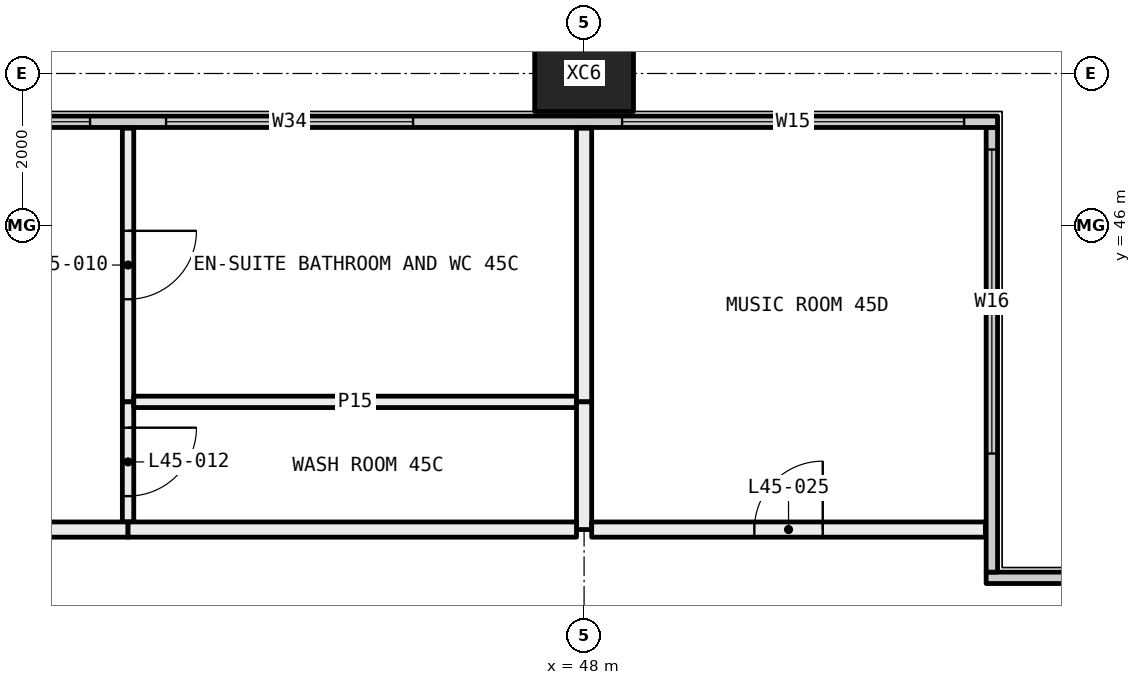
"""IFC4 building model, lengths in metres.
Left out: names, types, materials, properties, quantities, classifications, styles, units other than length and angle.
Written with IfcOpenShell. Run it as: python <this file> out.ifc"""

import sys

from ifc_helpers import new_model, si_unit, direction, frame, frame_2d, origin, origin_2d, place, context, subcontext, project, spatial, rectangle, hollow_rectangle, extrude, element, fill, save


model = new_model("IFC4")
c1 = context("Model", 3, precision=1e-05, world=origin(), true_north=direction((0.0, 1.0)))
c2 = subcontext(c1, "Body", "Model", "MODEL_VIEW")
j1 = project(units=[si_unit("LENGTHUNIT", "METRE"), si_unit("PLANEANGLEUNIT", "RADIAN")], contexts=[c1])
p1 = place(None, origin())
s1 = spatial("IfcSite", under=j1, at=p1, CompositionType="ELEMENT")
p2 = place(p1, origin())
s2 = spatial("IfcBuilding", under=s1, at=p2, CompositionType="ELEMENT")
p3 = place(p2, frame((0.0, 0.0, 172.05)))
s3 = spatial("IfcBuildingStorey", under=s2, at=p3, CompositionType="ELEMENT", Elevation=172.05)
p4 = place(p3, frame((48.0, 48.0, -0.4), z_axis=(0.0, 0.0, 1.0), x_axis=(1.0, 0.0, 0.0)))
e1 = element("IfcColumn", 1, at=p4, inside=s3, PredefinedType="COLUMN", context=c2, shape_type="SweptSolid", body=[
    extrude(hollow_rectangle(XDim=1.3, YDim=1.0, WallThickness=0.05, at=origin_2d()), origin(), (0.0, 0.0, 1.0), 3.45),
])
p5 = place(p3, frame((53.29, 41.365, 0.0), z_axis=(0.0, 0.0, 1.0), x_axis=(1.0, 0.0, 0.0)))
e2 = element("IfcWall", 2, at=p5, inside=s3, PredefinedType="ELEMENTEDWALL", context=c2, shape_type="SweptSolid", body=[
    extrude(rectangle(XDim=6.15, YDim=0.15, at=frame_2d((3.075, 0.0))), origin(), (0.0, 0.0, 1.0), 3.05),
])
p6 = place(p5, frame((1.71, 0.0, 0.45)))
e3 = element("IfcOpeningElement", 3, at=p6, cuts=e2, PredefinedType="OPENING", context=c2, shape_type="SweptSolid", body=[
    extrude(rectangle(XDim=4.0, YDim=2.55, at=frame_2d((2.0, 1.275))), frame((0.0, 0.085, 0.0), z_axis=(0.0, -1.0, 0.0), x_axis=(1.0, 0.0, 0.0)), (0.0, 0.0, 1.0), 0.17),
])
p7 = place(p3, frame((53.365, 41.44, 0.0), z_axis=(0.0, 0.0, 1.0), x_axis=(0.0, 1.0, 0.0)))
e4 = element("IfcWall", 4, at=p7, inside=s3, PredefinedType="ELEMENTEDWALL", context=c2, shape_type="SweptSolid", body=[
    extrude(rectangle(XDim=5.85, YDim=0.15, at=frame_2d((2.925, 0.0))), origin(), (0.0, 0.0, 1.0), 3.05),
])
p8 = place(p7, frame((1.56, 0.0, 0.45)))
e5 = element("IfcOpeningElement", 5, at=p8, cuts=e4, PredefinedType="OPENING", context=c2, shape_type="SweptSolid", body=[
    extrude(rectangle(XDim=4.0, YDim=2.55, at=frame_2d((2.0, 1.275))), frame((0.0, 0.085, 0.0), z_axis=(0.0, -1.0, 0.0), x_axis=(1.0, 0.0, 0.0)), (0.0, 0.0, 1.0), 0.17),
])
p9 = place(p3, frame((6.56, 47.365, 0.0), z_axis=(0.0, 0.0, 1.0), x_axis=(1.0, 0.0, 0.0)))
e6 = element("IfcWall", 6, at=p9, inside=s3, PredefinedType="ELEMENTEDWALL", context=c2, shape_type="SweptSolid", body=[
    extrude(rectangle(XDim=46.88, YDim=0.15, at=frame_2d((23.44, 0.0))), origin(), (0.0, 0.0, 1.0), 3.05),
])
p10 = place(p9, frame((0.44, 0.0, 0.45)))
e7 = element("IfcOpeningElement", 7, at=p10, cuts=e6, PredefinedType="OPENING", context=c2, shape_type="SweptSolid", body=[
    extrude(rectangle(XDim=4.5, YDim=2.55, at=frame_2d((2.25, 1.275))), frame((0.0, 0.085, 0.0), z_axis=(0.0, -1.0, 0.0), x_axis=(1.0, 0.0, 0.0)), (0.0, 0.0, 1.0), 0.17),
])
p11 = place(p9, frame((7.69, 0.0, 0.45)))
e8 = element("IfcOpeningElement", 8, at=p11, cuts=e6, PredefinedType="OPENING", context=c2, shape_type="SweptSolid", body=[
    extrude(rectangle(XDim=3.25, YDim=2.55, at=frame_2d((1.625, 1.275))), frame((0.0, 0.085, 0.0), z_axis=(0.0, -1.0, 0.0), x_axis=(1.0, 0.0, 0.0)), (0.0, 0.0, 1.0), 0.17),
])
p12 = place(p9, frame((11.94, 0.0, 0.45)))
e9 = element("IfcOpeningElement", 9, at=p12, cuts=e6, PredefinedType="OPENING", context=c2, shape_type="SweptSolid", body=[
    extrude(rectangle(XDim=3.25, YDim=2.55, at=frame_2d((1.625, 1.275))), frame((0.0, 0.085, 0.0), z_axis=(0.0, -1.0, 0.0), x_axis=(1.0, 0.0, 0.0)), (0.0, 0.0, 1.0), 0.17),
])
p13 = place(p9, frame((19.69, 0.0, 0.45)))
e10 = element("IfcOpeningElement", 10, at=p13, cuts=e6, PredefinedType="OPENING", context=c2, shape_type="SweptSolid", body=[
    extrude(rectangle(XDim=3.25, YDim=2.55, at=frame_2d((1.625, 1.275))), frame((0.0, 0.085, 0.0), z_axis=(0.0, -1.0, 0.0), x_axis=(1.0, 0.0, 0.0)), (0.0, 0.0, 1.0), 0.17),
])
p14 = place(p9, frame((23.94, 0.0, 0.45)))
e11 = element("IfcOpeningElement", 11, at=p14, cuts=e6, PredefinedType="OPENING", context=c2, shape_type="SweptSolid", body=[
    extrude(rectangle(XDim=2.0, YDim=2.55, at=frame_2d((1.0, 1.275))), frame((0.0, 0.085, 0.0), z_axis=(0.0, -1.0, 0.0), x_axis=(1.0, 0.0, 0.0)), (0.0, 0.0, 1.0), 0.17),
])
p15 = place(p9, frame((31.69, 0.0, 0.45)))
e12 = element("IfcOpeningElement", 12, at=p15, cuts=e6, PredefinedType="OPENING", context=c2, shape_type="SweptSolid", body=[
    extrude(rectangle(XDim=3.25, YDim=2.55, at=frame_2d((1.625, 1.275))), frame((0.0, 0.085, 0.0), z_axis=(0.0, -1.0, 0.0), x_axis=(1.0, 0.0, 0.0)), (0.0, 0.0, 1.0), 0.17),
])
p16 = place(p9, frame((35.94, 0.0, 0.45)))
e13 = element("IfcOpeningElement", 13, at=p16, cuts=e6, PredefinedType="OPENING", context=c2, shape_type="SweptSolid", body=[
    extrude(rectangle(XDim=3.25, YDim=2.55, at=frame_2d((1.625, 1.275))), frame((0.0, 0.085, 0.0), z_axis=(0.0, -1.0, 0.0), x_axis=(1.0, 0.0, 0.0)), (0.0, 0.0, 1.0), 0.17),
])
p17 = place(p9, frame((41.94, 0.0, 0.45)))
e14 = element("IfcOpeningElement", 14, at=p17, cuts=e6, PredefinedType="OPENING", context=c2, shape_type="SweptSolid", body=[
    extrude(rectangle(XDim=4.5, YDim=2.55, at=frame_2d((2.25, 1.275))), frame((0.0, 0.085, 0.0), z_axis=(0.0, -1.0, 0.0), x_axis=(1.0, 0.0, 0.0)), (0.0, 0.0, 1.0), 0.17),
])
p18 = place(p3, frame((42.0, 43.68, 0.0), z_axis=(0.0, 0.0, 1.0), x_axis=(0.0, 1.0, 0.0)))
e15 = element("IfcWall", 15, at=p18, inside=s3, PredefinedType="PARTITIONING", context=c2, shape_type="SweptSolid", body=[
    extrude(rectangle(XDim=3.6, YDim=0.15, at=frame_2d((1.8, 0.0))), origin(), (0.0, 0.0, 1.0), 3.05),
])
p19 = place(p18, frame((1.35, 0.0, 0.0)))
e16 = element("IfcOpeningElement", 16, at=p19, cuts=e15, PredefinedType="OPENING", context=c2, shape_type="SweptSolid", body=[
    extrude(rectangle(XDim=0.9, YDim=2.1, at=frame_2d((0.45, 1.05))), frame((0.0, 0.085, 0.0), z_axis=(0.0, -1.0, 0.0), x_axis=(1.0, 0.0, 0.0)), (0.0, 0.0, 1.0), 0.17),
])
p20 = place(p3, frame((42.0, 42.1, 0.0), z_axis=(0.0, 0.0, 1.0), x_axis=(0.0, 1.0, 0.0)))
e17 = element("IfcWall", 17, at=p20, inside=s3, PredefinedType="PARTITIONING", context=c2, shape_type="SweptSolid", body=[
    extrude(rectangle(XDim=1.58, YDim=0.15, at=frame_2d((0.79, 0.0))), origin(), (0.0, 0.0, 1.0), 3.05),
])
p21 = place(p20, frame((0.34, 0.0, 0.0)))
e18 = element("IfcOpeningElement", 18, at=p21, cuts=e17, PredefinedType="OPENING", context=c2, shape_type="SweptSolid", body=[
    extrude(rectangle(XDim=0.9, YDim=2.1, at=frame_2d((0.45, 1.05))), frame((0.0, 0.085, 0.0), z_axis=(0.0, -1.0, 0.0), x_axis=(1.0, 0.0, 0.0)), (0.0, 0.0, 1.0), 0.17),
])
p22 = place(p3, frame((36.1, 42.0, 0.0), z_axis=(0.0, 0.0, 1.0), x_axis=(1.0, 0.0, 0.0)))
e19 = element("IfcWall", 19, at=p22, inside=s3, PredefinedType="PARTITIONING", context=c2, shape_type="SweptSolid", body=[
    extrude(rectangle(XDim=5.9, YDim=0.2, at=frame_2d((2.95, 0.0))), origin(), (0.0, 0.0, 1.0), 3.05),
])
p23 = place(p3, frame((42.075, 43.68, 0.0), z_axis=(0.0, 0.0, 1.0), x_axis=(1.0, 0.0, 0.0)))
e20 = element("IfcWall", 20, at=p23, inside=s3, PredefinedType="PARTITIONING", context=c2, shape_type="SweptSolid", body=[
    extrude(rectangle(XDim=5.825, YDim=0.15, at=frame_2d((2.913, 0.0))), origin(), (0.0, 0.0, 1.0), 3.05),
])
p24 = place(p3, frame((48.0, 43.68, 0.0), z_axis=(0.0, 0.0, 1.0), x_axis=(0.0, 1.0, 0.0)))
e21 = element("IfcWall", 21, at=p24, inside=s3, PredefinedType="PARTITIONING", context=c2, shape_type="SweptSolid", body=[
    extrude(rectangle(XDim=3.6, YDim=0.2, at=frame_2d((1.8, 0.0))), origin(), (0.0, 0.0, 1.0), 3.05),
])
p25 = place(p3, frame((48.0, 42.0, 0.0), z_axis=(0.0, 0.0, 1.0), x_axis=(0.0, 1.0, 0.0)))
e22 = element("IfcWall", 22, at=p25, inside=s3, PredefinedType="PARTITIONING", context=c2, shape_type="SweptSolid", body=[
    extrude(rectangle(XDim=1.68, YDim=0.2, at=frame_2d((0.84, 0.0))), origin(), (0.0, 0.0, 1.0), 3.05),
])
p26 = place(p3, frame((42.0, 42.0, 0.0), z_axis=(0.0, 0.0, 1.0), x_axis=(1.0, 0.0, 0.0)))
e23 = element("IfcWall", 23, at=p26, inside=s3, PredefinedType="PARTITIONING", context=c2, shape_type="SweptSolid", body=[
    extrude(rectangle(XDim=5.9, YDim=0.2, at=frame_2d((2.95, 0.0))), origin(), (0.0, 0.0, 1.0), 3.05),
])
p27 = place(p3, frame((48.1, 42.0, 0.0), z_axis=(0.0, 0.0, 1.0), x_axis=(1.0, 0.0, 0.0)))
e24 = element("IfcWall", 24, at=p27, inside=s3, PredefinedType="PARTITIONING", context=c2, shape_type="SweptSolid", body=[
    extrude(rectangle(XDim=5.18, YDim=0.2, at=frame_2d((2.59, 0.0))), origin(), (0.0, 0.0, 1.0), 3.05),
])
p28 = place(p27, frame((2.14, 0.0, 0.0)))
e25 = element("IfcOpeningElement", 25, at=p28, cuts=e24, PredefinedType="OPENING", context=c2, shape_type="SweptSolid", body=[
    extrude(rectangle(XDim=0.9, YDim=2.1, at=frame_2d((0.45, 1.05))), frame((0.0, 0.11, 0.0), z_axis=(0.0, -1.0, 0.0), x_axis=(1.0, 0.0, 0.0)), (0.0, 0.0, 1.0), 0.22),
])
p29 = place(p8, origin())
e26 = element("IfcWindow", 26, at=p29, inside=s3, PartitioningType="SINGLE_PANEL", PredefinedType="WINDOW", context=c2, shape_type="SweptSolid", body=[
    extrude(rectangle(XDim=4.0, YDim=2.55, at=frame_2d((2.0, 1.275))), frame((0.0, 0.03, 0.0), z_axis=(0.0, -1.0, 0.0), x_axis=(1.0, 0.0, 0.0)), (0.0, 0.0, 1.0), 0.06),
])
fill(e5, e26)
p30 = place(p15, origin())
e27 = element("IfcWindow", 27, at=p30, inside=s3, PartitioningType="SINGLE_PANEL", PredefinedType="WINDOW", context=c2, shape_type="SweptSolid", body=[
    extrude(rectangle(XDim=3.25, YDim=2.55, at=frame_2d((1.625, 1.275))), frame((0.0, 0.03, 0.0), z_axis=(0.0, -1.0, 0.0), x_axis=(1.0, 0.0, 0.0)), (0.0, 0.0, 1.0), 0.06),
])
fill(e12, e27)
p31 = place(p16, origin())
e28 = element("IfcWindow", 28, at=p31, inside=s3, PartitioningType="SINGLE_PANEL", PredefinedType="WINDOW", context=c2, shape_type="SweptSolid", body=[
    extrude(rectangle(XDim=3.25, YDim=2.55, at=frame_2d((1.625, 1.275))), frame((0.0, 0.03, 0.0), z_axis=(0.0, -1.0, 0.0), x_axis=(1.0, 0.0, 0.0)), (0.0, 0.0, 1.0), 0.06),
])
fill(e13, e28)
p32 = place(p17, origin())
e29 = element("IfcWindow", 29, at=p32, inside=s3, PartitioningType="SINGLE_PANEL", PredefinedType="WINDOW", context=c2, shape_type="SweptSolid", body=[
    extrude(rectangle(XDim=4.5, YDim=2.55, at=frame_2d((2.25, 1.275))), frame((0.0, 0.03, 0.0), z_axis=(0.0, -1.0, 0.0), x_axis=(1.0, 0.0, 0.0)), (0.0, 0.0, 1.0), 0.06),
])
fill(e14, e29)
p33 = place(p19, frame((0.9, 0.0, 0.0), x_axis=(-1.0, 0.0, 0.0)))
e30 = element("IfcDoor", 30, at=p33, inside=s3, OperationType="SINGLE_SWING_RIGHT", PredefinedType="DOOR", context=c2, shape_type="SweptSolid", body=[
    extrude(rectangle(XDim=0.9, YDim=2.1, at=frame_2d((0.45, 1.05))), frame((0.0, 0.025, 0.0), z_axis=(0.0, -1.0, 0.0), x_axis=(1.0, 0.0, 0.0)), (0.0, 0.0, 1.0), 0.05),
])
fill(e16, e30)
p34 = place(p21, frame((0.9, 0.0, 0.0), x_axis=(-1.0, 0.0, 0.0)))
e31 = element("IfcDoor", 31, at=p34, inside=s3, OperationType="SINGLE_SWING_RIGHT", PredefinedType="DOOR", context=c2, shape_type="SweptSolid", body=[
    extrude(rectangle(XDim=0.9, YDim=2.1, at=frame_2d((0.45, 1.05))), frame((0.0, 0.025, 0.0), z_axis=(0.0, -1.0, 0.0), x_axis=(1.0, 0.0, 0.0)), (0.0, 0.0, 1.0), 0.05),
])
fill(e18, e31)
p35 = place(p28, origin())
e32 = element("IfcDoor", 32, at=p35, inside=s3, OperationType="SINGLE_SWING_LEFT", PredefinedType="DOOR", context=c2, shape_type="SweptSolid", body=[
    extrude(rectangle(XDim=0.9, YDim=2.1, at=frame_2d((0.45, 1.05))), frame((0.0, 0.025, 0.0), z_axis=(0.0, -1.0, 0.0), x_axis=(1.0, 0.0, 0.0)), (0.0, 0.0, 1.0), 0.05),
])
fill(e25, e32)
save(model, sys.argv[1])
